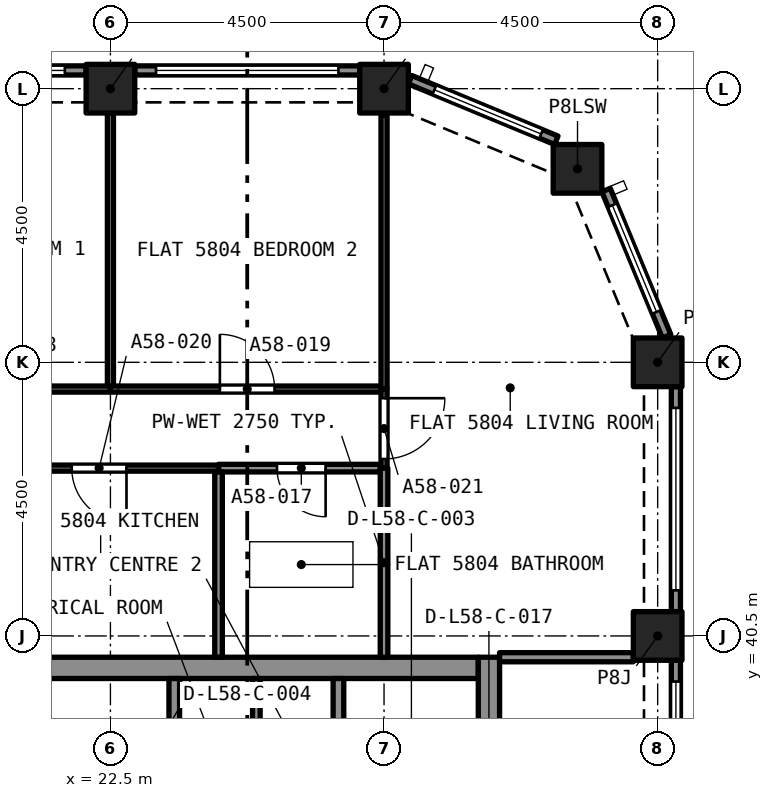
"""IFC4 building model, lengths in metres.
Left out: names, types, materials, properties, quantities, classifications, styles, units other than length and angle.
Written with IfcOpenShell. Run it as: python <this file> out.ifc"""

import sys

from ifc_helpers import new_model, si_unit, direction, frame, frame_2d, origin, origin_2d, place, context, subcontext, project, spatial, rectangle, extrude, element, fill, save


model = new_model("IFC4")
c1 = context("Model", 3, precision=1e-05, world=origin(), true_north=direction((0.0, 1.0)))
c2 = subcontext(c1, "Body", "Model", "MODEL_VIEW")
j1 = project(units=[si_unit("LENGTHUNIT", "METRE"), si_unit("PLANEANGLEUNIT", "RADIAN")], contexts=[c1])
p1 = place(None, origin())
s1 = spatial("IfcSite", under=j1, at=p1, CompositionType="ELEMENT")
p2 = place(p1, origin())
s2 = spatial("IfcBuilding", under=s1, at=p2, CompositionType="ELEMENT")
p3 = place(p2, frame((0.0, 0.0, 210.095)))
s3 = spatial("IfcBuildingStorey", under=s2, at=p3, CompositionType="ELEMENT", Elevation=210.095)
for number, where, z_axis, x_axis in (
    (1, (31.5, 40.5, 0.0), (0.0, 0.0, 1.0), (1.0, 0.0, 0.0)),
    (2, (31.5, 45.0, 0.0), (0.0, 0.0, 1.0), (1.0, 0.0, 0.0)),
    (3, (30.182, 48.182, 0.0), (0.0, 0.0, 1.0), (1.0, 0.0, 0.0)),
    (4, (22.5, 49.5, 0.0), (0.0, 0.0, 1.0), (1.0, 0.0, 0.0)),
    (5, (27.0, 49.5, 0.0), (0.0, 0.0, 1.0), (1.0, 0.0, 0.0)),
):
    element("IfcColumn", number, at=place(p3, frame(where, z_axis=z_axis, x_axis=x_axis)), inside=s3, PredefinedType="COLUMN", context=c2, shape_type="SweptSolid", body=[
        extrude(rectangle(XDim=0.8, YDim=0.8, at=origin_2d()), origin(), (0.0, 0.0, 1.0), 3.2),
    ])
p4 = place(p3, frame((20.95, 39.975, 0.0), z_axis=(0.0, 0.0, 1.0), x_axis=(1.0, 0.0, 0.0)))
e6 = element("IfcWall", 6, at=p4, inside=s3, PredefinedType="SOLIDWALL", context=c2, shape_type="SweptSolid", body=[
    extrude(rectangle(XDim=7.6, YDim=0.35, at=frame_2d((3.8, 0.0))), origin(), (0.0, 0.0, 1.0), 3.2),
])
p5 = place(p3, frame((28.725, 27.35, 0.0), z_axis=(0.0, 0.0, 1.0), x_axis=(0.0, 1.0, 0.0)))
e7 = element("IfcWall", 7, at=p5, inside=s3, PredefinedType="SOLIDWALL", context=c2, shape_type="SweptSolid", body=[
    extrude(rectangle(XDim=12.8, YDim=0.35, at=frame_2d((6.4, 0.0))), origin(), (0.0, 0.0, 1.0), 3.2),
])
p6 = place(p5, frame((8.6, 0.0, 0.0)))
e8 = element("IfcOpeningElement", 8, at=p6, cuts=e7, PredefinedType="OPENING", context=c2, shape_type="SweptSolid", body=[
    extrude(rectangle(XDim=1.2, YDim=2.1, at=frame_2d((0.6, 1.05))), frame((0.0, 0.185, 0.0), z_axis=(0.0, -1.0, 0.0), x_axis=(1.0, 0.0, 0.0)), (0.0, 0.0, 1.0), 0.37),
])
p7 = place(p3, frame((31.8, 40.1, 0.0), z_axis=(0.0, 0.0, 1.0), x_axis=(0.0, -1.0, 0.0)))
e9 = element("IfcWall", 9, at=p7, inside=s3, PredefinedType="SOLIDWALL", context=c2, shape_type="SweptSolid", body=[
    extrude(rectangle(XDim=3.7, YDim=0.15, at=frame_2d((1.85, 0.0))), origin(), (0.0, 0.0, 1.0), 3.2),
])
p8 = place(p7, frame((0.35, 0.0, 0.45)))
e10 = element("IfcOpeningElement", 10, at=p8, cuts=e9, PredefinedType="OPENING", context=c2, shape_type="SweptSolid", body=[
    extrude(rectangle(XDim=3.0, YDim=1.95, at=frame_2d((1.5, 0.975))), frame((0.0, 0.085, 0.0), z_axis=(0.0, -1.0, 0.0), x_axis=(1.0, 0.0, 0.0)), (0.0, 0.0, 1.0), 0.17),
])
p9 = place(p3, frame((31.8, 44.6, 0.0), z_axis=(0.0, 0.0, 1.0), x_axis=(0.0, -1.0, 0.0)))
e11 = element("IfcWall", 11, at=p9, inside=s3, PredefinedType="SOLIDWALL", context=c2, shape_type="SweptSolid", body=[
    extrude(rectangle(XDim=3.7, YDim=0.15, at=frame_2d((1.85, 0.0))), origin(), (0.0, 0.0, 1.0), 3.2),
])
p10 = place(p9, frame((0.35, 0.0, 0.45)))
e12 = element("IfcOpeningElement", 12, at=p10, cuts=e11, PredefinedType="OPENING", context=c2, shape_type="SweptSolid", body=[
    extrude(rectangle(XDim=3.0, YDim=1.95, at=frame_2d((1.5, 0.975))), frame((0.0, 0.085, 0.0), z_axis=(0.0, -1.0, 0.0), x_axis=(1.0, 0.0, 0.0)), (0.0, 0.0, 1.0), 0.17),
])
p11 = place(p3, frame((30.651, 47.833, 0.0), z_axis=(0.0, 0.0, 1.0), x_axis=(0.382669406082, -0.923885342263, 0.0)))
e13 = element("IfcWall", 13, at=p11, inside=s3, PredefinedType="SOLIDWALL", context=c2, shape_type="SweptSolid", body=[
    extrude(rectangle(XDim=2.602, YDim=0.15, at=frame_2d((1.301, 0.0))), origin(), (0.0, 0.0, 1.0), 3.2),
])
p12 = place(p11, frame((0.27, 0.0, 0.45)))
e14 = element("IfcOpeningElement", 14, at=p12, cuts=e13, PredefinedType="OPENING", context=c2, shape_type="SweptSolid", body=[
    extrude(rectangle(XDim=1.9, YDim=1.95, at=frame_2d((0.95, 0.975))), frame((0.0, 0.085, 0.0), z_axis=(0.0, -1.0, 0.0), x_axis=(1.0, 0.0, 0.0)), (0.0, 0.0, 1.0), 0.17),
])
p13 = place(p3, frame((27.429, 49.647, 0.0), z_axis=(0.0, 0.0, 1.0), x_axis=(0.923885342263, -0.382669406082, 0.0)))
e15 = element("IfcWall", 15, at=p13, inside=s3, PredefinedType="SOLIDWALL", context=c2, shape_type="SweptSolid", body=[
    extrude(rectangle(XDim=2.602, YDim=0.15, at=frame_2d((1.301, 0.0))), origin(), (0.0, 0.0, 1.0), 3.2),
])
p14 = place(p13, frame((0.432, 0.0, 0.45)))
e16 = element("IfcOpeningElement", 16, at=p14, cuts=e15, PredefinedType="OPENING", context=c2, shape_type="SweptSolid", body=[
    extrude(rectangle(XDim=1.9, YDim=1.95, at=frame_2d((0.95, 0.975))), frame((0.0, 0.085, 0.0), z_axis=(0.0, -1.0, 0.0), x_axis=(1.0, 0.0, 0.0)), (0.0, 0.0, 1.0), 0.17),
])
p15 = place(p3, frame((22.9, 49.8, 0.0), z_axis=(0.0, 0.0, 1.0), x_axis=(1.0, 0.0, 0.0)))
e17 = element("IfcWall", 17, at=p15, inside=s3, PredefinedType="SOLIDWALL", context=c2, shape_type="SweptSolid", body=[
    extrude(rectangle(XDim=3.7, YDim=0.15, at=frame_2d((1.85, 0.0))), origin(), (0.0, 0.0, 1.0), 3.2),
])
p16 = place(p15, frame((0.35, 0.0, 0.45)))
e18 = element("IfcOpeningElement", 18, at=p16, cuts=e17, PredefinedType="OPENING", context=c2, shape_type="SweptSolid", body=[
    extrude(rectangle(XDim=3.0, YDim=1.95, at=frame_2d((1.5, 0.975))), frame((0.0, 0.085, 0.0), z_axis=(0.0, -1.0, 0.0), x_axis=(1.0, 0.0, 0.0)), (0.0, 0.0, 1.0), 0.17),
])
p17 = place(p3, frame((18.4, 49.8, 0.0), z_axis=(0.0, 0.0, 1.0), x_axis=(1.0, 0.0, 0.0)))
e19 = element("IfcWall", 19, at=p17, inside=s3, PredefinedType="SOLIDWALL", context=c2, shape_type="SweptSolid", body=[
    extrude(rectangle(XDim=3.7, YDim=0.15, at=frame_2d((1.85, 0.0))), origin(), (0.0, 0.0, 1.0), 3.2),
])
p18 = place(p17, frame((0.35, 0.0, 0.45)))
e20 = element("IfcOpeningElement", 20, at=p18, cuts=e19, PredefinedType="OPENING", context=c2, shape_type="SweptSolid", body=[
    extrude(rectangle(XDim=3.0, YDim=1.95, at=frame_2d((1.5, 0.975))), frame((0.0, 0.085, 0.0), z_axis=(0.0, -1.0, 0.0), x_axis=(1.0, 0.0, 0.0)), (0.0, 0.0, 1.0), 0.17),
])
p19 = place(p3, frame((26.938, 43.26, 0.0), z_axis=(0.0, 0.0, 1.0), x_axis=(-1.0, 0.0, 0.0)))
e21 = element("IfcWall", 21, at=p19, inside=s3, PredefinedType="PARTITIONING", context=c2, shape_type="SweptSolid", body=[
    extrude(rectangle(XDim=2.659, YDim=0.125, at=frame_2d((1.33, 0.0))), origin(), (0.0, 0.0, 1.0), 2.75),
])
p20 = place(p19, frame((0.898, 0.0, 0.0)))
e22 = element("IfcOpeningElement", 22, at=p20, cuts=e21, PredefinedType="OPENING", context=c2, shape_type="SweptSolid", body=[
    extrude(rectangle(XDim=0.8, YDim=2.1, at=frame_2d((0.4, 1.05))), frame((0.0, 0.073, 0.0), z_axis=(0.0, -1.0, 0.0), x_axis=(1.0, 0.0, 0.0)), (0.0, 0.0, 1.0), 0.145),
])
p21 = place(p3, frame((24.278, 40.15, 0.0), z_axis=(0.0, 0.0, 1.0), x_axis=(0.0, 1.0, 0.0)))
e23 = element("IfcWall", 23, at=p21, inside=s3, PredefinedType="PARTITIONING", context=c2, shape_type="SweptSolid", body=[
    extrude(rectangle(XDim=3.048, YDim=0.125, at=frame_2d((1.524, 0.0))), origin(), (0.0, 0.0, 1.0), 2.75),
])
p22 = place(p3, frame((27.0, 40.15, 0.0), z_axis=(0.0, 0.0, 1.0), x_axis=(0.0, 1.0, 0.0)))
e24 = element("IfcWall", 24, at=p22, inside=s3, PredefinedType="PARTITIONING", context=c2, shape_type="SweptSolid", body=[
    extrude(rectangle(XDim=3.11, YDim=0.125, at=frame_2d((1.555, 0.0))), origin(), (0.0, 0.0, 1.0), 2.75),
])
p23 = place(p3, frame((22.5, 44.61, 0.0), z_axis=(0.0, 0.0, 1.0), x_axis=(0.0, 1.0, 0.0)))
e25 = element("IfcWall", 25, at=p23, inside=s3, PredefinedType="PARTITIONING", context=c2, shape_type="SweptSolid", body=[
    extrude(rectangle(XDim=4.49, YDim=0.1, at=frame_2d((2.245, 0.0))), origin(), (0.0, 0.0, 1.0), 2.75),
])
p24 = place(p3, frame((18.1, 44.56, 0.0), z_axis=(0.0, 0.0, 1.0), x_axis=(1.0, 0.0, 0.0)))
e26 = element("IfcWall", 26, at=p24, inside=s3, PredefinedType="PARTITIONING", context=c2, shape_type="SweptSolid", body=[
    extrude(rectangle(XDim=4.4, YDim=0.1, at=frame_2d((2.2, 0.0))), origin(), (0.0, 0.0, 1.0), 2.75),
])
p25 = place(p24, frame((1.7, 0.0, 0.0)))
e27 = element("IfcOpeningElement", 27, at=p25, cuts=e26, PredefinedType="OPENING", context=c2, shape_type="SweptSolid", body=[
    extrude(rectangle(XDim=0.9, YDim=2.1, at=frame_2d((0.45, 1.05))), frame((0.0, 0.06, 0.0), z_axis=(0.0, -1.0, 0.0), x_axis=(1.0, 0.0, 0.0)), (0.0, 0.0, 1.0), 0.12),
])
p26 = place(p3, frame((22.5, 44.56, 0.0), z_axis=(0.0, 0.0, 1.0), x_axis=(1.0, 0.0, 0.0)))
e28 = element("IfcWall", 28, at=p26, inside=s3, PredefinedType="PARTITIONING", context=c2, shape_type="SweptSolid", body=[
    extrude(rectangle(XDim=4.45, YDim=0.1, at=frame_2d((2.225, 0.0))), origin(), (0.0, 0.0, 1.0), 2.75),
])
p27 = place(p26, frame((1.8, 0.0, 0.0)))
e29 = element("IfcOpeningElement", 29, at=p27, cuts=e28, PredefinedType="OPENING", context=c2, shape_type="SweptSolid", body=[
    extrude(rectangle(XDim=0.9, YDim=2.1, at=frame_2d((0.45, 1.05))), frame((0.0, 0.06, 0.0), z_axis=(0.0, -1.0, 0.0), x_axis=(1.0, 0.0, 0.0)), (0.0, 0.0, 1.0), 0.12),
])
p28 = place(p3, frame((27.0, 44.56, 0.0), z_axis=(0.0, 0.0, 1.0), x_axis=(0.0, 1.0, 0.0)))
e30 = element("IfcWall", 30, at=p28, inside=s3, PredefinedType="PARTITIONING", context=c2, shape_type="SweptSolid", body=[
    extrude(rectangle(XDim=4.507, YDim=0.1, at=frame_2d((2.253, 0.0))), origin(), (0.0, 0.0, 1.0), 2.75),
])
p29 = place(p3, frame((24.278, 43.26, 0.0), z_axis=(0.0, 0.0, 1.0), x_axis=(-1.0, 0.0, 0.0)))
e31 = element("IfcWall", 31, at=p29, inside=s3, PredefinedType="PARTITIONING", context=c2, shape_type="SweptSolid", body=[
    extrude(rectangle(XDim=3.978, YDim=0.1, at=frame_2d((1.989, 0.0))), origin(), (0.0, 0.0, 1.0), 2.75),
])
p30 = place(p29, frame((1.514, 0.0, 0.0)))
e32 = element("IfcOpeningElement", 32, at=p30, cuts=e31, PredefinedType="OPENING", context=c2, shape_type="SweptSolid", body=[
    extrude(rectangle(XDim=0.9, YDim=2.1, at=frame_2d((0.45, 1.05))), frame((0.0, 0.06, 0.0), z_axis=(0.0, -1.0, 0.0), x_axis=(1.0, 0.0, 0.0)), (0.0, 0.0, 1.0), 0.12),
])
p31 = place(p3, frame((27.0, 44.56, 0.0), z_axis=(0.0, 0.0, 1.0), x_axis=(0.0, -1.0, 0.0)))
e33 = element("IfcWall", 33, at=p31, inside=s3, PredefinedType="PARTITIONING", context=c2, shape_type="SweptSolid", body=[
    extrude(rectangle(XDim=1.3, YDim=0.1, at=frame_2d((0.65, 0.0))), origin(), (0.0, 0.0, 1.0), 2.75),
])
p32 = place(p31, frame((0.15, 0.0, 0.0)))
e34 = element("IfcOpeningElement", 34, at=p32, cuts=e33, PredefinedType="OPENING", context=c2, shape_type="SweptSolid", body=[
    extrude(rectangle(XDim=1.0, YDim=2.1, at=frame_2d((0.5, 1.05))), frame((0.0, 0.06, 0.0), z_axis=(0.0, -1.0, 0.0), x_axis=(1.0, 0.0, 0.0)), (0.0, 0.0, 1.0), 0.12),
])
p33 = place(p3, frame((28.9, 40.15, 0.0), z_axis=(0.0, 0.0, 1.0), x_axis=(1.0, 0.0, 0.0)))
e35 = element("IfcWall", 35, at=p33, inside=s3, PredefinedType="PARTITIONING", context=c2, shape_type="SweptSolid", body=[
    extrude(rectangle(XDim=2.2, YDim=0.15, at=frame_2d((1.1, 0.0))), origin(), (0.0, 0.0, 1.0), 2.75),
])
for number, where, z_axis, x_axis in (
    (36, (23.55, 37.5, 0.0), (0.0, 0.0, 1.0), (0.0, 1.0, 0.0)),
    (37, (26.25, 37.5, 0.0), (0.0, 0.0, 1.0), (0.0, 1.0, 0.0)),
):
    element("IfcWall", number, at=place(p3, frame(where, z_axis=z_axis, x_axis=x_axis)), inside=s3, PredefinedType="SOLIDWALL", context=c2, shape_type="SweptSolid", body=[
        extrude(rectangle(XDim=2.3, YDim=0.175, at=frame_2d((1.15, 0.0))), origin(), (0.0, 0.0, 1.0), 2.9),
    ])
p34 = place(p3, frame((24.9, 37.5, 0.0), z_axis=(0.0, 0.0, 1.0), x_axis=(0.0, 1.0, 0.0)))
e38 = element("IfcWall", 38, at=p34, inside=s3, PredefinedType="PARTITIONING", context=c2, shape_type="SweptSolid", body=[
    extrude(rectangle(XDim=2.3, YDim=0.125, at=frame_2d((1.15, 0.0))), origin(), (0.0, 0.0, 1.0), 2.9),
])
p35 = place(p8, origin())
e39 = element("IfcWindow", 39, at=p35, inside=s3, PartitioningType="SINGLE_PANEL", PredefinedType="WINDOW", context=c2, shape_type="SweptSolid", body=[
    extrude(rectangle(XDim=3.0, YDim=1.95, at=frame_2d((1.5, 0.975))), frame((0.0, 0.03, 0.0), z_axis=(0.0, -1.0, 0.0), x_axis=(1.0, 0.0, 0.0)), (0.0, 0.0, 1.0), 0.06),
])
fill(e10, e39)
p36 = place(p10, origin())
e40 = element("IfcWindow", 40, at=p36, inside=s3, PartitioningType="SINGLE_PANEL", PredefinedType="WINDOW", context=c2, shape_type="SweptSolid", body=[
    extrude(rectangle(XDim=3.0, YDim=1.95, at=frame_2d((1.5, 0.975))), frame((0.0, 0.03, 0.0), z_axis=(0.0, -1.0, 0.0), x_axis=(1.0, 0.0, 0.0)), (0.0, 0.0, 1.0), 0.06),
])
fill(e12, e40)
p37 = place(p12, origin())
e41 = element("IfcWindow", 41, at=p37, inside=s3, PartitioningType="SINGLE_PANEL", PredefinedType="WINDOW", context=c2, shape_type="SweptSolid", body=[
    extrude(rectangle(XDim=1.9, YDim=1.95, at=frame_2d((0.95, 0.975))), frame((0.0, 0.03, 0.0), z_axis=(0.0, -1.0, 0.0), x_axis=(1.0, 0.0, 0.0)), (0.0, 0.0, 1.0), 0.06),
])
fill(e14, e41)
p38 = place(p14, origin())
e42 = element("IfcWindow", 42, at=p38, inside=s3, PartitioningType="SINGLE_PANEL", PredefinedType="WINDOW", context=c2, shape_type="SweptSolid", body=[
    extrude(rectangle(XDim=1.9, YDim=1.95, at=frame_2d((0.95, 0.975))), frame((0.0, 0.03, 0.0), z_axis=(0.0, -1.0, 0.0), x_axis=(1.0, 0.0, 0.0)), (0.0, 0.0, 1.0), 0.06),
])
fill(e16, e42)
p39 = place(p16, origin())
e43 = element("IfcWindow", 43, at=p39, inside=s3, PartitioningType="SINGLE_PANEL", PredefinedType="WINDOW", context=c2, shape_type="SweptSolid", body=[
    extrude(rectangle(XDim=3.0, YDim=1.95, at=frame_2d((1.5, 0.975))), frame((0.0, 0.03, 0.0), z_axis=(0.0, -1.0, 0.0), x_axis=(1.0, 0.0, 0.0)), (0.0, 0.0, 1.0), 0.06),
])
fill(e18, e43)
p40 = place(p18, origin())
e44 = element("IfcWindow", 44, at=p40, inside=s3, PartitioningType="SINGLE_PANEL", PredefinedType="WINDOW", context=c2, shape_type="SweptSolid", body=[
    extrude(rectangle(XDim=3.0, YDim=1.95, at=frame_2d((1.5, 0.975))), frame((0.0, 0.03, 0.0), z_axis=(0.0, -1.0, 0.0), x_axis=(1.0, 0.0, 0.0)), (0.0, 0.0, 1.0), 0.06),
])
fill(e20, e44)
p41 = place(p20, origin())
e45 = element("IfcDoor", 45, at=p41, inside=s3, OperationType="SINGLE_SWING_LEFT", PredefinedType="DOOR", context=c2, shape_type="SweptSolid", body=[
    extrude(rectangle(XDim=0.8, YDim=2.1, at=frame_2d((0.4, 1.05))), frame((0.0, 0.025, 0.0), z_axis=(0.0, -1.0, 0.0), x_axis=(1.0, 0.0, 0.0)), (0.0, 0.0, 1.0), 0.05),
])
fill(e22, e45)
p42 = place(p27, origin())
e46 = element("IfcDoor", 46, at=p42, inside=s3, OperationType="SINGLE_SWING_RIGHT", PredefinedType="DOOR", context=c2, shape_type="SweptSolid", body=[
    extrude(rectangle(XDim=0.9, YDim=2.1, at=frame_2d((0.45, 1.05))), frame((0.0, 0.025, 0.0), z_axis=(0.0, -1.0, 0.0), x_axis=(1.0, 0.0, 0.0)), (0.0, 0.0, 1.0), 0.05),
])
fill(e29, e46)
p43 = place(p30, origin())
e47 = element("IfcDoor", 47, at=p43, inside=s3, OperationType="SINGLE_SWING_LEFT", PredefinedType="DOOR", context=c2, shape_type="SweptSolid", body=[
    extrude(rectangle(XDim=0.9, YDim=2.1, at=frame_2d((0.45, 1.05))), frame((0.0, 0.025, 0.0), z_axis=(0.0, -1.0, 0.0), x_axis=(1.0, 0.0, 0.0)), (0.0, 0.0, 1.0), 0.05),
])
fill(e32, e47)
p44 = place(p32, origin())
e48 = element("IfcDoor", 48, at=p44, inside=s3, OperationType="SINGLE_SWING_LEFT", PredefinedType="DOOR", context=c2, shape_type="SweptSolid", body=[
    extrude(rectangle(XDim=1.0, YDim=2.1, at=frame_2d((0.5, 1.05))), frame((0.0, 0.025, 0.0), z_axis=(0.0, -1.0, 0.0), x_axis=(1.0, 0.0, 0.0)), (0.0, 0.0, 1.0), 0.05),
])
fill(e34, e48)
save(model, sys.argv[1])
